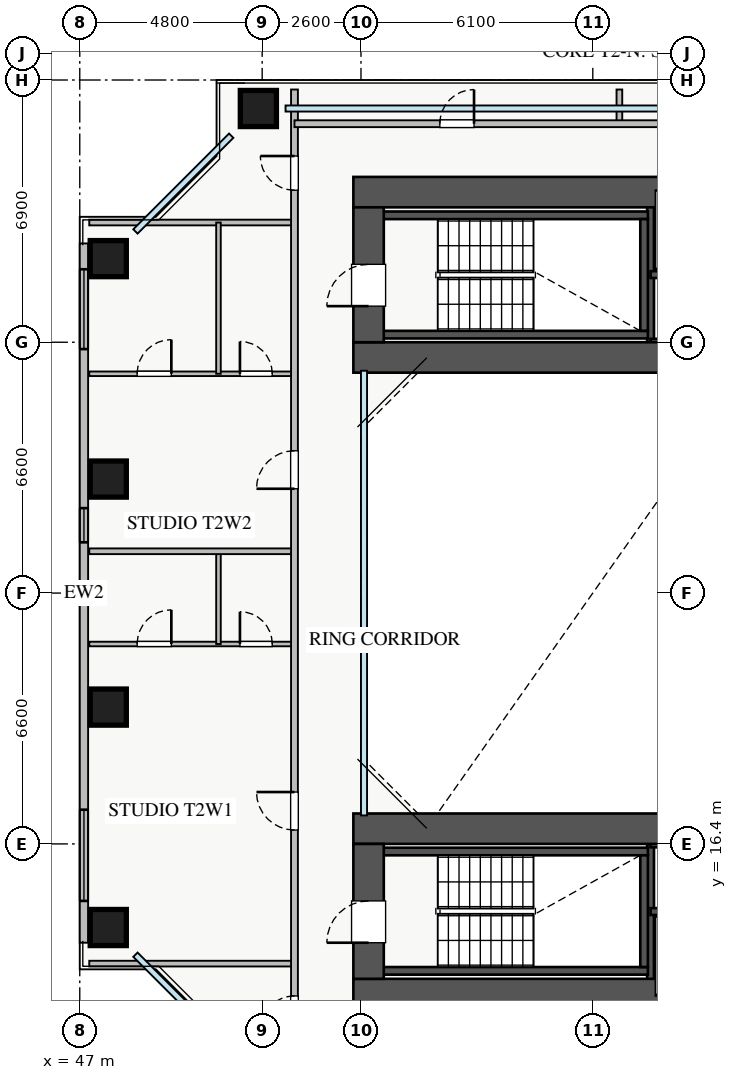
"""IFC4 building model, lengths in metres.
Left out: names, types, materials, properties, quantities, classifications, styles, units other than length and angle.
Written with IfcOpenShell. Run it as: python <this file> out.ifc"""

import sys

from ifc_helpers import new_model, si_unit, direction, frame, frame_2d, origin, origin_2d, place, context, subcontext, project, spatial, rectangle, extrude, source, transform, mapped, element, fill, save


model = new_model("IFC4")
c1 = context("Model", 3, precision=1e-05, world=origin(), true_north=direction((0.0, 1.0)))
c2 = subcontext(c1, "Body", "Model", "MODEL_VIEW")
j1 = project(units=[si_unit("LENGTHUNIT", "METRE"), si_unit("PLANEANGLEUNIT", "RADIAN")], contexts=[c1])
p1 = place(None, origin())
s1 = spatial("IfcSite", under=j1, at=p1, CompositionType="ELEMENT")
p2 = place(p1, origin())
s2 = spatial("IfcBuilding", under=s1, at=p2, CompositionType="ELEMENT")
p3 = place(p2, frame((0.0, 0.0, 42.5)))
s3 = spatial("IfcBuildingStorey", under=s2, at=p3, CompositionType="ELEMENT", Elevation=42.5)
p4 = place(p3, frame((62.02, 29.6, 0.0), z_axis=(0.0, 0.0, 1.0), x_axis=(0.0, 1.0, 0.0)))
e1 = element("IfcWall", 1, at=p4, inside=s3, PredefinedType="SHEAR", context=c2, shape_type="SweptSolid", body=[
    extrude(rectangle(XDim=3.95, YDim=0.18, at=frame_2d((1.975, 0.0))), origin(), (0.0, 0.0, 1.0), 3.03),
])
for number, where, z_axis, x_axis in (
    (2, (62.02, 31.38, 0.0), (0.0, 0.0, 1.0), (1.0, 0.0, 0.0)),
    (3, (62.02, 29.6, 0.0), (0.0, 0.0, 1.0), (1.0, 0.0, 0.0)),
):
    element("IfcWall", number, at=place(p3, frame(where, z_axis=z_axis, x_axis=x_axis)), inside=s3, PredefinedType="SHEAR", context=c2, shape_type="SweptSolid", body=[
        extrude(rectangle(XDim=1.86, YDim=0.18, at=frame_2d((0.93, 0.0))), origin(), (0.0, 0.0, 1.0), 3.03),
    ])
p5 = place(p3, frame((62.02, 12.45, 0.0), z_axis=(0.0, 0.0, 1.0), x_axis=(0.0, 1.0, 0.0)))
e4 = element("IfcWall", 4, at=p5, inside=s3, PredefinedType="SHEAR", context=c2, shape_type="SweptSolid", body=[
    extrude(rectangle(XDim=3.95, YDim=0.18, at=frame_2d((1.975, 0.0))), origin(), (0.0, 0.0, 1.0), 3.03),
])
for number, where, z_axis, x_axis in (
    (5, (62.02, 14.62, 0.0), (0.0, 0.0, 1.0), (1.0, 0.0, 0.0)),
    (6, (62.02, 16.4, 0.0), (0.0, 0.0, 1.0), (1.0, 0.0, 0.0)),
):
    element("IfcWall", number, at=place(p3, frame(where, z_axis=z_axis, x_axis=x_axis)), inside=s3, PredefinedType="SHEAR", context=c2, shape_type="SweptSolid", body=[
        extrude(rectangle(XDim=1.86, YDim=0.18, at=frame_2d((0.93, 0.0))), origin(), (0.0, 0.0, 1.0), 3.03),
    ])
for number, where, z_axis, x_axis in (
    (7, (54.8, 29.8, 0.0), (0.0, 0.0, 1.0), (1.0, 0.0, 0.0)),
    (8, (54.8, 32.94, 0.0), (0.0, 0.0, 1.0), (1.0, 0.0, 0.0)),
):
    element("IfcWall", number, at=place(p3, frame(where, z_axis=z_axis, x_axis=x_axis)), inside=s3, PredefinedType="SHEAR", context=c2, shape_type="SweptSolid", body=[
        extrude(rectangle(XDim=7.15, YDim=0.2, at=frame_2d((3.575, 0.0))), origin(), (0.0, 0.0, 1.0), 3.25),
    ])
p6 = place(p3, frame((61.85, 29.9, 0.0), z_axis=(0.0, 0.0, 1.0), x_axis=(0.0, 1.0, 0.0)))
e9 = element("IfcWall", 9, at=p6, inside=s3, PredefinedType="SHEAR", context=c2, shape_type="SweptSolid", body=[
    extrude(rectangle(XDim=2.94, YDim=0.2, at=frame_2d((1.47, 0.0))), origin(), (0.0, 0.0, 1.0), 3.25),
])
for number, where, z_axis, x_axis in (
    (10, (54.8, 13.06, 0.0), (0.0, 0.0, 1.0), (1.0, 0.0, 0.0)),
    (11, (54.8, 16.2, 0.0), (0.0, 0.0, 1.0), (1.0, 0.0, 0.0)),
):
    element("IfcWall", number, at=place(p3, frame(where, z_axis=z_axis, x_axis=x_axis)), inside=s3, PredefinedType="SHEAR", context=c2, shape_type="SweptSolid", body=[
        extrude(rectangle(XDim=7.15, YDim=0.2, at=frame_2d((3.575, 0.0))), origin(), (0.0, 0.0, 1.0), 3.25),
    ])
p7 = place(p3, frame((61.85, 13.16, 0.0), z_axis=(0.0, 0.0, 1.0), x_axis=(0.0, 1.0, 0.0)))
e12 = element("IfcWall", 12, at=p7, inside=s3, PredefinedType="SHEAR", context=c2, shape_type="SweptSolid", body=[
    extrude(rectangle(XDim=2.94, YDim=0.2, at=frame_2d((1.47, 0.0))), origin(), (0.0, 0.0, 1.0), 3.25),
])
p8 = place(p3, frame((54.2, 29.2, 0.0), z_axis=(0.0, 0.0, 1.0), x_axis=(1.0, 0.0, 0.0)))
e13 = element("IfcWall", 13, at=p8, inside=s3, PredefinedType="SHEAR", context=c2, shape_type="SweptSolid", body=[
    extrude(rectangle(XDim=12.6, YDim=0.8, at=frame_2d((6.3, 0.0))), origin(), (0.0, 0.0, 1.0), 3.25),
])
p9 = place(p3, frame((54.2, 33.55, 0.0), z_axis=(0.0, 0.0, 1.0), x_axis=(1.0, 0.0, 0.0)))
e14 = element("IfcWall", 14, at=p9, inside=s3, PredefinedType="SHEAR", context=c2, shape_type="SweptSolid", body=[
    extrude(rectangle(XDim=12.6, YDim=0.8, at=frame_2d((6.3, 0.0))), origin(), (0.0, 0.0, 1.0), 3.25),
])
p10 = place(p9, frame((8.2, 0.0, 0.0)))
e15 = element("IfcOpeningElement", 15, at=p10, cuts=e14, PredefinedType="OPENING", context=c2, shape_type="SweptSolid", body=[
    extrude(rectangle(XDim=1.1, YDim=2.05, at=frame_2d((0.55, 1.025))), frame((0.0, 0.41, 0.0), z_axis=(0.0, -1.0, 0.0), x_axis=(1.0, 0.0, 0.0)), (0.0, 0.0, 1.0), 0.82),
])
p11 = place(p3, frame((54.6, 29.6, 0.0), z_axis=(0.0, 0.0, 1.0), x_axis=(0.0, 1.0, 0.0)))
e16 = element("IfcWall", 16, at=p11, inside=s3, PredefinedType="SHEAR", context=c2, shape_type="SweptSolid", body=[
    extrude(rectangle(XDim=3.55, YDim=0.8, at=frame_2d((1.775, 0.0))), origin(), (0.0, 0.0, 1.0), 3.25),
])
p12 = place(p11, frame((0.95, 0.0, 0.0)))
e17 = element("IfcOpeningElement", 17, at=p12, cuts=e16, PredefinedType="OPENING", context=c2, shape_type="SweptSolid", body=[
    extrude(rectangle(XDim=1.1, YDim=2.05, at=frame_2d((0.55, 1.025))), frame((0.0, 0.41, 0.0), z_axis=(0.0, -1.0, 0.0), x_axis=(1.0, 0.0, 0.0)), (0.0, 0.0, 1.0), 0.82),
])
p13 = place(p3, frame((54.2, 12.45, 0.0), z_axis=(0.0, 0.0, 1.0), x_axis=(1.0, 0.0, 0.0)))
e18 = element("IfcWall", 18, at=p13, inside=s3, PredefinedType="SHEAR", context=c2, shape_type="SweptSolid", body=[
    extrude(rectangle(XDim=12.6, YDim=0.8, at=frame_2d((6.3, 0.0))), origin(), (0.0, 0.0, 1.0), 3.25),
])
p14 = place(p13, frame((8.2, 0.0, 0.0)))
e19 = element("IfcOpeningElement", 19, at=p14, cuts=e18, PredefinedType="OPENING", context=c2, shape_type="SweptSolid", body=[
    extrude(rectangle(XDim=1.1, YDim=2.05, at=frame_2d((0.55, 1.025))), frame((0.0, 0.41, 0.0), z_axis=(0.0, -1.0, 0.0), x_axis=(1.0, 0.0, 0.0)), (0.0, 0.0, 1.0), 0.82),
])
p15 = place(p3, frame((54.2, 16.8, 0.0), z_axis=(0.0, 0.0, 1.0), x_axis=(1.0, 0.0, 0.0)))
e20 = element("IfcWall", 20, at=p15, inside=s3, PredefinedType="SHEAR", context=c2, shape_type="SweptSolid", body=[
    extrude(rectangle(XDim=12.6, YDim=0.8, at=frame_2d((6.3, 0.0))), origin(), (0.0, 0.0, 1.0), 3.25),
])
p16 = place(p3, frame((54.6, 12.85, 0.0), z_axis=(0.0, 0.0, 1.0), x_axis=(0.0, 1.0, 0.0)))
e21 = element("IfcWall", 21, at=p16, inside=s3, PredefinedType="SHEAR", context=c2, shape_type="SweptSolid", body=[
    extrude(rectangle(XDim=3.55, YDim=0.8, at=frame_2d((1.775, 0.0))), origin(), (0.0, 0.0, 1.0), 3.25),
])
p17 = place(p16, frame((0.95, 0.0, 0.0)))
e22 = element("IfcOpeningElement", 22, at=p17, cuts=e21, PredefinedType="OPENING", context=c2, shape_type="SweptSolid", body=[
    extrude(rectangle(XDim=1.1, YDim=2.05, at=frame_2d((0.55, 1.025))), frame((0.0, 0.41, 0.0), z_axis=(0.0, -1.0, 0.0), x_axis=(1.0, 0.0, 0.0)), (0.0, 0.0, 1.0), 0.82),
])
m1 = source(origin(), c2, "Body", "SweptSolid", [
    extrude(rectangle(XDim=0.95, YDim=0.95, at=origin_2d()), origin(), (0.0, 0.0, 1.0), 3.25),
])
for number, where, z_axis, x_axis in (
    (23, (51.7, 35.75, 0.0), (0.0, 0.0, 1.0), (1.0, 0.0, 0.0)),
    (24, (47.75, 14.2, 0.0), (0.0, 0.0, 1.0), (1.0, 0.0, 0.0)),
    (25, (47.75, 20.0, 0.0), (0.0, 0.0, 1.0), (1.0, 0.0, 0.0)),
    (26, (47.75, 26.0, 0.0), (0.0, 0.0, 1.0), (1.0, 0.0, 0.0)),
    (27, (47.75, 31.8, 0.0), (0.0, 0.0, 1.0), (1.0, 0.0, 0.0)),
):
    element("IfcColumn", number, at=place(p3, frame(where, z_axis=z_axis, x_axis=x_axis)), inside=s3, PredefinedType="COLUMN", context=c2, shape_type="MappedRepresentation", body=[
        mapped(m1, transform((0.0, 0.0, 0.0), x_axis=(1.0, 0.0, 0.0), y_axis=(0.0, 1.0, 0.0), z_axis=(0.0, 0.0, 1.0), scale=1.0)),
    ])
p18 = place(p3, frame((47.11, 13.8, 0.0), z_axis=(0.0, 0.0, 1.0), x_axis=(0.0, 1.0, 0.0)))
e28 = element("IfcWall", 28, at=p18, inside=s3, PredefinedType="STANDARD", context=c2, shape_type="SweptSolid", body=[
    extrude(rectangle(XDim=18.4, YDim=0.22, at=frame_2d((9.2, 0.0))), origin(), (0.0, 0.0, 1.0), 2.57),
])
p19 = place(p18, frame((1.1, 0.0, 0.9)))
e29 = element("IfcOpeningElement", 29, at=p19, cuts=e28, PredefinedType="OPENING", context=c2, shape_type="SweptSolid", body=[
    extrude(rectangle(XDim=2.4, YDim=1.48, at=frame_2d((1.2, 0.74))), frame((0.0, 0.12, 0.0), z_axis=(0.0, -1.0, 0.0), x_axis=(1.0, 0.0, 0.0)), (0.0, 0.0, 1.0), 0.24),
])
p20 = place(p18, frame((15.62, 0.0, 0.9)))
e30 = element("IfcOpeningElement", 30, at=p20, cuts=e28, PredefinedType="OPENING", context=c2, shape_type="SweptSolid", body=[
    extrude(rectangle(XDim=2.1, YDim=1.5, at=frame_2d((1.05, 0.75))), frame((0.0, 0.12, 0.0), z_axis=(0.0, -1.0, 0.0), x_axis=(1.0, 0.0, 0.0)), (0.0, 0.0, 1.0), 0.24),
])
p21 = place(p18, frame((10.535, 0.0, 0.9)))
e31 = element("IfcOpeningElement", 31, at=p21, cuts=e28, PredefinedType="OPENING", context=c2, shape_type="SweptSolid", body=[
    extrude(rectangle(XDim=0.9, YDim=1.2, at=frame_2d((0.45, 0.6))), frame((0.0, 0.12, 0.0), z_axis=(0.0, -1.0, 0.0), x_axis=(1.0, 0.0, 0.0)), (0.0, 0.0, 1.0), 0.24),
])
for number, where, z_axis, x_axis in (
    (32, (47.25, 32.75, 0.0), (0.0, 0.0, 1.0), (1.0, 0.0, 0.0)),
    (33, (47.25, 13.25, 0.0), (0.0, 0.0, 1.0), (1.0, 0.0, 0.0)),
):
    element("IfcWall", number, at=place(p3, frame(where, z_axis=z_axis, x_axis=x_axis)), inside=s3, PredefinedType="PARTITIONING", context=c2, shape_type="SweptSolid", body=[
        extrude(rectangle(XDim=5.4, YDim=0.15, at=frame_2d((2.7, 0.0))), origin(), (0.0, 0.0, 1.0), 3.03),
    ])
p22 = place(p3, frame((47.25, 21.66, 0.0), z_axis=(0.0, 0.0, 1.0), x_axis=(1.0, 0.0, 0.0)))
e34 = element("IfcWall", 34, at=p22, inside=s3, PredefinedType="PLUMBINGWALL", context=c2, shape_type="SweptSolid", body=[
    extrude(rectangle(XDim=5.4, YDim=0.12, at=frame_2d((2.7, 0.0))), origin(), (0.0, 0.0, 1.0), 3.03),
])
p23 = place(p22, frame((1.26, 0.0, 0.0)))
e35 = element("IfcOpeningElement", 35, at=p23, cuts=e34, PredefinedType="OPENING", context=c2, shape_type="SweptSolid", body=[
    extrude(rectangle(XDim=0.9, YDim=2.05, at=frame_2d((0.45, 1.025))), frame((0.0, 0.07, 0.0), z_axis=(0.0, -1.0, 0.0), x_axis=(1.0, 0.0, 0.0)), (0.0, 0.0, 1.0), 0.14),
])
p24 = place(p22, frame((3.965, 0.0, 0.0)))
e36 = element("IfcOpeningElement", 36, at=p24, cuts=e34, PredefinedType="OPENING", context=c2, shape_type="SweptSolid", body=[
    extrude(rectangle(XDim=0.85, YDim=2.05, at=frame_2d((0.425, 1.025))), frame((0.0, 0.07, 0.0), z_axis=(0.0, -1.0, 0.0), x_axis=(1.0, 0.0, 0.0)), (0.0, 0.0, 1.0), 0.14),
])
p25 = place(p3, frame((50.65, 21.66, 0.0), z_axis=(0.0, 0.0, 1.0), x_axis=(0.0, 1.0, 0.0)))
e37 = element("IfcWall", 37, at=p25, inside=s3, PredefinedType="PLUMBINGWALL", context=c2, shape_type="SweptSolid", body=[
    extrude(rectangle(XDim=2.44, YDim=0.12, at=frame_2d((1.22, 0.0))), origin(), (0.0, 0.0, 1.0), 3.03),
])
p26 = place(p3, frame((47.25, 28.77, 0.0), z_axis=(0.0, 0.0, 1.0), x_axis=(1.0, 0.0, 0.0)))
e38 = element("IfcWall", 38, at=p26, inside=s3, PredefinedType="PLUMBINGWALL", context=c2, shape_type="SweptSolid", body=[
    extrude(rectangle(XDim=5.4, YDim=0.12, at=frame_2d((2.7, 0.0))), origin(), (0.0, 0.0, 1.0), 3.03),
])
p27 = place(p26, frame((1.26, 0.0, 0.0)))
e39 = element("IfcOpeningElement", 39, at=p27, cuts=e38, PredefinedType="OPENING", context=c2, shape_type="SweptSolid", body=[
    extrude(rectangle(XDim=0.9, YDim=2.05, at=frame_2d((0.45, 1.025))), frame((0.0, 0.07, 0.0), z_axis=(0.0, -1.0, 0.0), x_axis=(1.0, 0.0, 0.0)), (0.0, 0.0, 1.0), 0.14),
])
p28 = place(p26, frame((3.965, 0.0, 0.0)))
e40 = element("IfcOpeningElement", 40, at=p28, cuts=e38, PredefinedType="OPENING", context=c2, shape_type="SweptSolid", body=[
    extrude(rectangle(XDim=0.85, YDim=2.05, at=frame_2d((0.425, 1.025))), frame((0.0, 0.07, 0.0), z_axis=(0.0, -1.0, 0.0), x_axis=(1.0, 0.0, 0.0)), (0.0, 0.0, 1.0), 0.14),
])
p29 = place(p3, frame((50.65, 28.77, 0.0), z_axis=(0.0, 0.0, 1.0), x_axis=(0.0, 1.0, 0.0)))
e41 = element("IfcWall", 41, at=p29, inside=s3, PredefinedType="PLUMBINGWALL", context=c2, shape_type="SweptSolid", body=[
    extrude(rectangle(XDim=3.98, YDim=0.12, at=frame_2d((1.99, 0.0))), origin(), (0.0, 0.0, 1.0), 3.03),
])
p30 = place(p3, frame((47.25, 24.1, 0.0), z_axis=(0.0, 0.0, 1.0), x_axis=(1.0, 0.0, 0.0)))
e42 = element("IfcWall", 42, at=p30, inside=s3, PredefinedType="PARTITIONING", context=c2, shape_type="SweptSolid", body=[
    extrude(rectangle(XDim=5.4, YDim=0.15, at=frame_2d((2.7, 0.0))), origin(), (0.0, 0.0, 1.0), 3.03),
])
p31 = place(p3, frame((52.65, 9.75, 0.0), z_axis=(0.0, 0.0, 1.0), x_axis=(0.0, 1.0, 0.0)))
e43 = element("IfcWall", 43, at=p31, inside=s3, PredefinedType="PARTITIONING", context=c2, shape_type="SweptSolid", body=[
    extrude(rectangle(XDim=26.5, YDim=0.18, at=frame_2d((13.25, 0.0))), origin(), (0.0, 0.0, 1.0), 3.03),
])
p32 = place(p31, frame((23.85, 0.0, 0.0)))
e44 = element("IfcOpeningElement", 44, at=p32, cuts=e43, PredefinedType="OPENING", context=c2, shape_type="SweptSolid", body=[
    extrude(rectangle(XDim=0.9, YDim=2.05, at=frame_2d((0.45, 1.025))), frame((0.0, 0.1, 0.0), z_axis=(0.0, -1.0, 0.0), x_axis=(1.0, 0.0, 0.0)), (0.0, 0.0, 1.0), 0.2),
])
p33 = place(p31, frame((1.75, 0.0, 0.0)))
e45 = element("IfcOpeningElement", 45, at=p33, cuts=e43, PredefinedType="OPENING", context=c2, shape_type="SweptSolid", body=[
    extrude(rectangle(XDim=0.9, YDim=2.05, at=frame_2d((0.45, 1.025))), frame((0.0, 0.1, 0.0), z_axis=(0.0, -1.0, 0.0), x_axis=(1.0, 0.0, 0.0)), (0.0, 0.0, 1.0), 0.2),
])
p34 = place(p31, frame((7.015, 0.0, 0.0)))
e46 = element("IfcOpeningElement", 46, at=p34, cuts=e43, PredefinedType="OPENING", context=c2, shape_type="SweptSolid", body=[
    extrude(rectangle(XDim=1.0, YDim=2.05, at=frame_2d((0.5, 1.025))), frame((0.0, 0.1, 0.0), z_axis=(0.0, -1.0, 0.0), x_axis=(1.0, 0.0, 0.0)), (0.0, 0.0, 1.0), 0.2),
])
p35 = place(p31, frame((15.995, 0.0, 0.0)))
e47 = element("IfcOpeningElement", 47, at=p35, cuts=e43, PredefinedType="OPENING", context=c2, shape_type="SweptSolid", body=[
    extrude(rectangle(XDim=1.0, YDim=2.05, at=frame_2d((0.5, 1.025))), frame((0.0, 0.1, 0.0), z_axis=(0.0, -1.0, 0.0), x_axis=(1.0, 0.0, 0.0)), (0.0, 0.0, 1.0), 0.2),
])
p36 = place(p3, frame((61.2, 35.35, 0.0), z_axis=(0.0, 0.0, 1.0), x_axis=(0.0, 1.0, 0.0)))
e48 = element("IfcWall", 48, at=p36, inside=s3, PredefinedType="PARTITIONING", context=c2, shape_type="SweptSolid", body=[
    extrude(rectangle(XDim=0.9, YDim=0.15, at=frame_2d((0.45, 0.0))), origin(), (0.0, 0.0, 1.0), 3.03),
])
p37 = place(p3, frame((52.65, 35.35, 0.0), z_axis=(0.0, 0.0, 1.0), x_axis=(1.0, 0.0, 0.0)))
e49 = element("IfcWall", 49, at=p37, inside=s3, PredefinedType="PARTITIONING", context=c2, shape_type="SweptSolid", body=[
    extrude(rectangle(XDim=17.0, YDim=0.18, at=frame_2d((8.5, 0.0))), origin(), (0.0, 0.0, 1.0), 3.03),
])
p38 = place(p37, frame((3.825, 0.0, 0.0)))
e50 = element("IfcOpeningElement", 50, at=p38, cuts=e49, PredefinedType="OPENING", context=c2, shape_type="SweptSolid", body=[
    extrude(rectangle(XDim=0.9, YDim=2.05, at=frame_2d((0.45, 1.025))), frame((0.0, 0.1, 0.0), z_axis=(0.0, -1.0, 0.0), x_axis=(1.0, 0.0, 0.0)), (0.0, 0.0, 1.0), 0.2),
])
p39 = place(p37, frame((12.325, 0.0, 0.0)))
e51 = element("IfcOpeningElement", 51, at=p39, cuts=e49, PredefinedType="OPENING", context=c2, shape_type="SweptSolid", body=[
    extrude(rectangle(XDim=0.9, YDim=2.05, at=frame_2d((0.45, 1.025))), frame((0.0, 0.1, 0.0), z_axis=(0.0, -1.0, 0.0), x_axis=(1.0, 0.0, 0.0)), (0.0, 0.0, 1.0), 0.2),
])
m2 = source(origin(), c2, "Body", "SweptSolid", [
    extrude(rectangle(XDim=2.4, YDim=1.48, at=frame_2d((1.2, 0.74))), frame((0.0, 0.03, 0.0), z_axis=(0.0, -1.0, 0.0), x_axis=(1.0, 0.0, 0.0)), (0.0, 0.0, 1.0), 0.06),
])
p40 = place(p19, origin())
e52 = element("IfcWindow", 52, at=p40, inside=s3, PartitioningType="TRIPLE_PANEL_VERTICAL", PredefinedType="WINDOW", context=c2, shape_type="MappedRepresentation", body=[
    mapped(m2, transform((0.0, 0.0, 0.0), x_axis=(1.0, 0.0, 0.0), y_axis=(0.0, 1.0, 0.0), z_axis=(0.0, 0.0, 1.0), scale=1.0)),
])
fill(e29, e52)
m3 = source(origin(), c2, "Body", "SweptSolid", [
    extrude(rectangle(XDim=2.1, YDim=1.5, at=frame_2d((1.05, 0.75))), frame((0.0, 0.03, 0.0), z_axis=(0.0, -1.0, 0.0), x_axis=(1.0, 0.0, 0.0)), (0.0, 0.0, 1.0), 0.06),
])
p41 = place(p20, origin())
e53 = element("IfcWindow", 53, at=p41, inside=s3, PartitioningType="TRIPLE_PANEL_VERTICAL", PredefinedType="WINDOW", context=c2, shape_type="MappedRepresentation", body=[
    mapped(m3, transform((0.0, 0.0, 0.0), x_axis=(1.0, 0.0, 0.0), y_axis=(0.0, 1.0, 0.0), z_axis=(0.0, 0.0, 1.0), scale=1.0)),
])
fill(e30, e53)
m4 = source(origin(), c2, "Body", "SweptSolid", [
    extrude(rectangle(XDim=1.1, YDim=2.05, at=frame_2d((0.55, 1.025))), frame((0.0, 0.025, 0.0), z_axis=(0.0, -1.0, 0.0), x_axis=(1.0, 0.0, 0.0)), (0.0, 0.0, 1.0), 0.05),
])
p42 = place(p12, origin())
e54 = element("IfcDoor", 54, at=p42, inside=s3, OperationType="SINGLE_SWING_LEFT", PredefinedType="DOOR", context=c2, shape_type="MappedRepresentation", body=[
    mapped(m4, transform((0.0, 0.0, 0.0), x_axis=(1.0, 0.0, 0.0), y_axis=(0.0, 1.0, 0.0), z_axis=(0.0, 0.0, 1.0), scale=1.0)),
])
fill(e17, e54)
p43 = place(p17, origin())
e55 = element("IfcDoor", 55, at=p43, inside=s3, OperationType="SINGLE_SWING_LEFT", PredefinedType="DOOR", context=c2, shape_type="MappedRepresentation", body=[
    mapped(m4, transform((0.0, 0.0, 0.0), x_axis=(1.0, 0.0, 0.0), y_axis=(0.0, 1.0, 0.0), z_axis=(0.0, 0.0, 1.0), scale=1.0)),
])
fill(e22, e55)
m5 = source(origin(), c2, "Body", "SweptSolid", [
    extrude(rectangle(XDim=0.9, YDim=2.05, at=frame_2d((0.45, 1.025))), frame((0.0, 0.025, 0.0), z_axis=(0.0, -1.0, 0.0), x_axis=(1.0, 0.0, 0.0)), (0.0, 0.0, 1.0), 0.05),
])
p44 = place(p23, origin())
e56 = element("IfcDoor", 56, at=p44, inside=s3, OperationType="SINGLE_SWING_RIGHT", PredefinedType="DOOR", context=c2, shape_type="MappedRepresentation", body=[
    mapped(m5, transform((0.0, 0.0, 0.0), x_axis=(1.0, 0.0, 0.0), y_axis=(0.0, 1.0, 0.0), z_axis=(0.0, 0.0, 1.0), scale=1.0)),
])
fill(e35, e56)
m6 = source(origin(), c2, "Body", "SweptSolid", [
    extrude(rectangle(XDim=0.85, YDim=2.05, at=frame_2d((0.425, 1.025))), frame((0.0, 0.025, 0.0), z_axis=(0.0, -1.0, 0.0), x_axis=(1.0, 0.0, 0.0)), (0.0, 0.0, 1.0), 0.05),
])
p45 = place(p24, origin())
e57 = element("IfcDoor", 57, at=p45, inside=s3, OperationType="SINGLE_SWING_LEFT", PredefinedType="DOOR", context=c2, shape_type="MappedRepresentation", body=[
    mapped(m6, transform((0.0, 0.0, 0.0), x_axis=(1.0, 0.0, 0.0), y_axis=(0.0, 1.0, 0.0), z_axis=(0.0, 0.0, 1.0), scale=1.0)),
])
fill(e36, e57)
p46 = place(p27, origin())
e58 = element("IfcDoor", 58, at=p46, inside=s3, OperationType="SINGLE_SWING_RIGHT", PredefinedType="DOOR", context=c2, shape_type="MappedRepresentation", body=[
    mapped(m5, transform((0.0, 0.0, 0.0), x_axis=(1.0, 0.0, 0.0), y_axis=(0.0, 1.0, 0.0), z_axis=(0.0, 0.0, 1.0), scale=1.0)),
])
fill(e39, e58)
p47 = place(p28, origin())
e59 = element("IfcDoor", 59, at=p47, inside=s3, OperationType="SINGLE_SWING_LEFT", PredefinedType="DOOR", context=c2, shape_type="MappedRepresentation", body=[
    mapped(m6, transform((0.0, 0.0, 0.0), x_axis=(1.0, 0.0, 0.0), y_axis=(0.0, 1.0, 0.0), z_axis=(0.0, 0.0, 1.0), scale=1.0)),
])
fill(e40, e59)
p48 = place(p32, origin())
e60 = element("IfcDoor", 60, at=p48, inside=s3, OperationType="SINGLE_SWING_RIGHT", PredefinedType="DOOR", context=c2, shape_type="MappedRepresentation", body=[
    mapped(m5, transform((0.0, 0.0, 0.0), x_axis=(1.0, 0.0, 0.0), y_axis=(0.0, 1.0, 0.0), z_axis=(0.0, 0.0, 1.0), scale=1.0)),
])
fill(e44, e60)
p49 = place(p33, origin())
e61 = element("IfcDoor", 61, at=p49, inside=s3, OperationType="SINGLE_SWING_LEFT", PredefinedType="DOOR", context=c2, shape_type="MappedRepresentation", body=[
    mapped(m5, transform((0.0, 0.0, 0.0), x_axis=(1.0, 0.0, 0.0), y_axis=(0.0, 1.0, 0.0), z_axis=(0.0, 0.0, 1.0), scale=1.0)),
])
fill(e45, e61)
m7 = source(origin(), c2, "Body", "SweptSolid", [
    extrude(rectangle(XDim=1.0, YDim=2.05, at=frame_2d((0.5, 1.025))), frame((0.0, 0.025, 0.0), z_axis=(0.0, -1.0, 0.0), x_axis=(1.0, 0.0, 0.0)), (0.0, 0.0, 1.0), 0.05),
])
p50 = place(p34, origin())
e62 = element("IfcDoor", 62, at=p50, inside=s3, OperationType="SINGLE_SWING_RIGHT", PredefinedType="DOOR", context=c2, shape_type="MappedRepresentation", body=[
    mapped(m7, transform((0.0, 0.0, 0.0), x_axis=(1.0, 0.0, 0.0), y_axis=(0.0, 1.0, 0.0), z_axis=(0.0, 0.0, 1.0), scale=1.0)),
])
fill(e46, e62)
p51 = place(p35, origin())
e63 = element("IfcDoor", 63, at=p51, inside=s3, OperationType="SINGLE_SWING_LEFT", PredefinedType="DOOR", context=c2, shape_type="MappedRepresentation", body=[
    mapped(m7, transform((0.0, 0.0, 0.0), x_axis=(1.0, 0.0, 0.0), y_axis=(0.0, 1.0, 0.0), z_axis=(0.0, 0.0, 1.0), scale=1.0)),
])
fill(e47, e63)
p52 = place(p38, origin())
e64 = element("IfcDoor", 64, at=p52, inside=s3, OperationType="SINGLE_SWING_RIGHT", PredefinedType="DOOR", context=c2, shape_type="MappedRepresentation", body=[
    mapped(m5, transform((0.0, 0.0, 0.0), x_axis=(1.0, 0.0, 0.0), y_axis=(0.0, 1.0, 0.0), z_axis=(0.0, 0.0, 1.0), scale=1.0)),
])
fill(e50, e64)
m8 = source(origin(), c2, "Body", "SweptSolid", [
    extrude(rectangle(XDim=0.9, YDim=1.2, at=frame_2d((0.45, 0.6))), frame((0.0, 0.03, 0.0), z_axis=(0.0, -1.0, 0.0), x_axis=(1.0, 0.0, 0.0)), (0.0, 0.0, 1.0), 0.06),
])
p53 = place(p21, origin())
e65 = element("IfcWindow", 65, at=p53, inside=s3, PartitioningType="SINGLE_PANEL", PredefinedType="WINDOW", context=c2, shape_type="MappedRepresentation", body=[
    mapped(m8, transform((0.0, 0.0, 0.0), x_axis=(1.0, 0.0, 0.0), y_axis=(0.0, 1.0, 0.0), z_axis=(0.0, 0.0, 1.0), scale=1.0)),
])
fill(e31, e65)
save(model, sys.argv[1])
